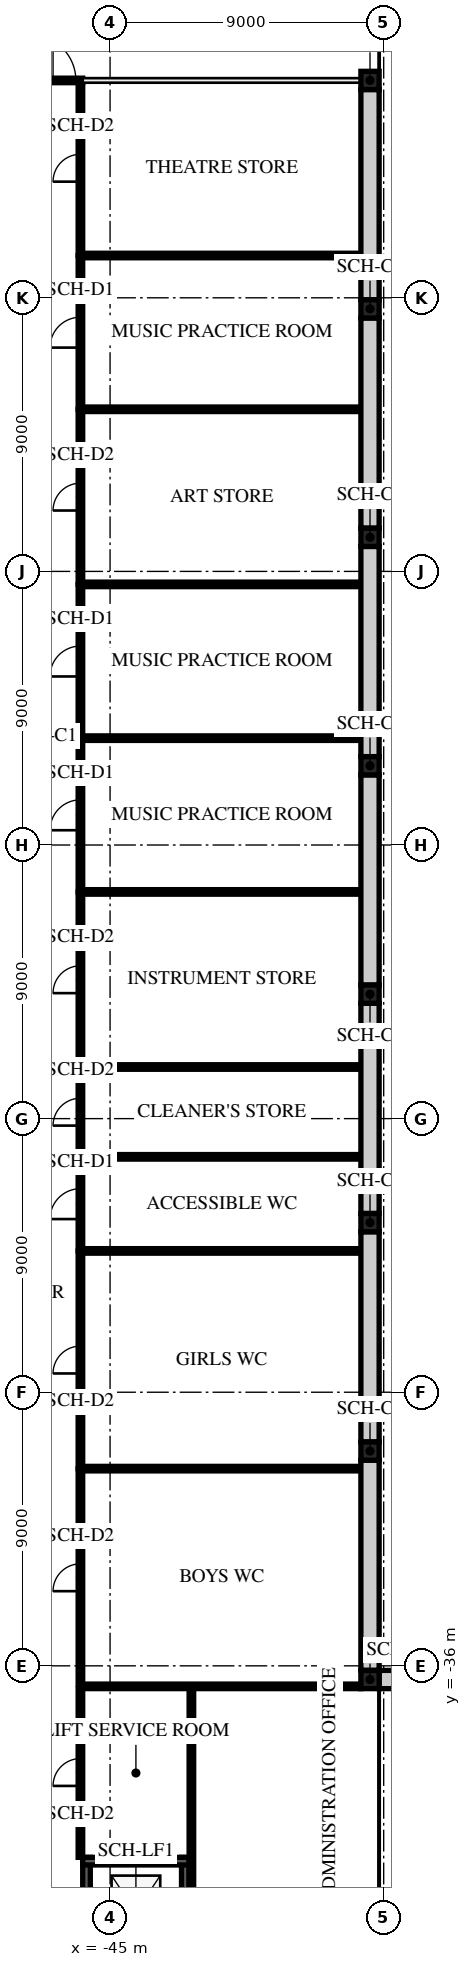
"""IFC4 building model, lengths in metres.
Left out: names, types, materials, properties, quantities, classifications, styles, units other than length and angle.
Written with IfcOpenShell. Run it as: python <this file> out.ifc"""

import sys

from ifc_helpers import new_model, si_unit, direction, frame, frame_2d, origin, origin_2d, place, context, subcontext, project, spatial, rectangle, extrude, element, fill, save


model = new_model("IFC4")
c1 = context("Model", 3, precision=1e-05, world=origin(), true_north=direction((0.0, 1.0)))
c2 = subcontext(c1, "Body", "Model", "MODEL_VIEW")
j1 = project(units=[si_unit("LENGTHUNIT", "METRE"), si_unit("PLANEANGLEUNIT", "RADIAN")], contexts=[c1])
p1 = place(None, origin())
s1 = spatial("IfcSite", under=j1, at=p1, CompositionType="ELEMENT")
p2 = place(p1, origin())
s2 = spatial("IfcBuilding", under=s1, at=p2, CompositionType="ELEMENT")
p3 = place(p2, origin())
s3 = spatial("IfcBuildingStorey", under=s2, at=p3, CompositionType="ELEMENT", Elevation=0.0)
p4 = place(p3, frame((-36.0, -18.0, 0.0), z_axis=(0.0, 0.0, 1.0), x_axis=(1.0, 0.0, 0.0)))
e1 = element("IfcWall", 1, at=p4, inside=s3, PredefinedType="PARTITIONING", context=c2, shape_type="SweptSolid", body=[
    extrude(rectangle(XDim=0.9, YDim=0.15, at=frame_2d((0.45, 0.0))), origin(), (0.0, 0.0, 1.0), 4.1),
])
p5 = place(p3, frame((-36.0, -13.0, 0.0), z_axis=(0.0, 0.0, 1.0), x_axis=(1.0, 0.0, 0.0)))
e2 = element("IfcWall", 2, at=p5, inside=s3, PredefinedType="PARTITIONING", context=c2, shape_type="SweptSolid", body=[
    extrude(rectangle(XDim=18.075, YDim=0.15, at=frame_2d((9.038, 0.0))), origin(), (0.0, 0.0, 1.0), 4.1),
])
p6 = place(p5, frame((8.1, 0.0, 0.0)))
e3 = element("IfcOpeningElement", 3, at=p6, cuts=e2, PredefinedType="OPENING", context=c2, shape_type="SweptSolid", body=[
    extrude(rectangle(XDim=1.8, YDim=2.1, at=frame_2d((0.9, 1.05))), frame((0.0, 0.085, 0.0), z_axis=(0.0, -1.0, 0.0), x_axis=(1.0, 0.0, 0.0)), (0.0, 0.0, 1.0), 0.17),
])
for number, where, z_axis, x_axis in (
    (4, (-36.0, -4.5, 0.0), (0.0, 0.0, 1.0), (1.0, 0.0, 0.0)),
    (5, (-36.0, 4.5, 0.0), (0.0, 0.0, 1.0), (1.0, 0.0, 0.0)),
):
    element("IfcWall", number, at=place(p3, frame(where, z_axis=z_axis, x_axis=x_axis)), inside=s3, PredefinedType="PARTITIONING", context=c2, shape_type="SweptSolid", body=[
        extrude(rectangle(XDim=17.925, YDim=0.1, at=frame_2d((8.962, 0.0))), origin(), (0.0, 0.0, 1.0), 4.1),
    ])
p7 = place(p3, frame((-36.0, 13.0, 0.0), z_axis=(0.0, 0.0, 1.0), x_axis=(1.0, 0.0, 0.0)))
e6 = element("IfcWall", 6, at=p7, inside=s3, PredefinedType="PARTITIONING", context=c2, shape_type="SweptSolid", body=[
    extrude(rectangle(XDim=18.075, YDim=0.15, at=frame_2d((9.038, 0.0))), origin(), (0.0, 0.0, 1.0), 4.1),
])
p8 = place(p7, frame((8.5, 0.0, 0.0)))
e7 = element("IfcOpeningElement", 7, at=p8, cuts=e6, PredefinedType="OPENING", context=c2, shape_type="SweptSolid", body=[
    extrude(rectangle(XDim=1.0, YDim=2.1, at=frame_2d((0.5, 1.05))), frame((0.0, 0.085, 0.0), z_axis=(0.0, -1.0, 0.0), x_axis=(1.0, 0.0, 0.0)), (0.0, 0.0, 1.0), 0.17),
])
for number, where, z_axis, x_axis in (
    (8, (-45.775, -45.9, -1.5), (0.0, 0.0, 1.0), (0.0, 1.0, 0.0)),
    (9, (-42.525, -45.9, -1.5), (0.0, 0.0, 1.0), (0.0, 1.0, 0.0)),
):
    element("IfcWall", number, at=place(p3, frame(where, z_axis=z_axis, x_axis=x_axis)), inside=s3, PredefinedType="SHEAR", context=c2, shape_type="SweptSolid", body=[
        extrude(rectangle(XDim=3.6, YDim=0.25, at=frame_2d((1.8, 0.0))), origin(), (0.0, 0.0, 1.0), 6.0),
    ])
p9 = place(p3, frame((-45.9, -42.425, -1.5), z_axis=(0.0, 0.0, 1.0), x_axis=(1.0, 0.0, 0.0)))
e10 = element("IfcWall", 10, at=p9, inside=s3, PredefinedType="SHEAR", context=c2, shape_type="SweptSolid", body=[
    extrude(rectangle(XDim=3.5, YDim=0.25, at=frame_2d((1.75, 0.0))), origin(), (0.0, 0.0, 1.0), 6.0),
])
for number, where, z_axis, x_axis in (
    (11, (-36.45, -36.45, -0.2), (0.0, 0.0, 1.0), (1.0, 0.0, 0.0)),
    (12, (-36.45, -28.936, -0.2), (0.0, 0.0, 1.0), (1.0, 0.0, 0.0)),
    (13, (-36.45, -21.421, -0.2), (0.0, 0.0, 1.0), (1.0, 0.0, 0.0)),
    (14, (-36.45, -13.907, -0.2), (0.0, 0.0, 1.0), (1.0, 0.0, 0.0)),
    (15, (-36.45, -6.393, -0.2), (0.0, 0.0, 1.0), (1.0, 0.0, 0.0)),
    (16, (-36.45, 1.121, -0.2), (0.0, 0.0, 1.0), (1.0, 0.0, 0.0)),
    (17, (-36.45, 8.636, -0.2), (0.0, 0.0, 1.0), (1.0, 0.0, 0.0)),
    (18, (-36.45, 16.15, -0.2), (0.0, 0.0, 1.0), (1.0, 0.0, 0.0)),
):
    element("IfcColumn", number, at=place(p3, frame(where, z_axis=z_axis, x_axis=x_axis)), inside=s3, PredefinedType="COLUMN", context=c2, shape_type="SweptSolid", body=[
        extrude(rectangle(XDim=0.6, YDim=0.6, at=origin_2d()), origin(), (0.0, 0.0, 1.0), 4.7),
    ])
for number, where, z_axis, x_axis in (
    (19, (-45.9, -29.513, 0.0), (0.0, 0.0, 1.0), (1.0, 0.0, 0.0)),
    (20, (-45.9, -22.352, 0.0), (0.0, 0.0, 1.0), (1.0, 0.0, 0.0)),
    (21, (-45.9, -19.257, 0.0), (0.0, 0.0, 1.0), (1.0, 0.0, 0.0)),
    (22, (-45.9, -16.302, 0.0), (0.0, 0.0, 1.0), (1.0, 0.0, 0.0)),
    (23, (-45.9, -10.543, 0.0), (0.0, 0.0, 1.0), (1.0, 0.0, 0.0)),
    (24, (-45.9, -5.485, 0.0), (0.0, 0.0, 1.0), (1.0, 0.0, 0.0)),
    (25, (-45.9, -0.427, 0.0), (0.0, 0.0, 1.0), (1.0, 0.0, 0.0)),
    (26, (-45.9, 5.333, 0.0), (0.0, 0.0, 1.0), (1.0, 0.0, 0.0)),
    (27, (-45.9, 10.391, 0.0), (0.0, 0.0, 1.0), (1.0, 0.0, 0.0)),
):
    element("IfcWall", number, at=place(p3, frame(where, z_axis=z_axis, x_axis=x_axis)), inside=s3, PredefinedType="PARTITIONING", context=c2, shape_type="SweptSolid", body=[
        extrude(rectangle(XDim=9.15, YDim=0.15, at=frame_2d((4.575, 0.0))), origin(), (0.0, 0.0, 1.0), 4.1),
    ])
p10 = place(p3, frame((-45.975, -36.6, 0.0), z_axis=(0.0, 0.0, 1.0), x_axis=(0.0, 1.0, 0.0)))
e28 = element("IfcWall", 28, at=p10, inside=s3, PredefinedType="PARTITIONING", context=c2, shape_type="SweptSolid", body=[
    extrude(rectangle(XDim=7.087, YDim=0.15, at=frame_2d((3.543, 0.0))), origin(), (0.0, 0.0, 1.0), 4.1),
])
p11 = place(p10, frame((3.056, 0.0, 0.0)))
e29 = element("IfcOpeningElement", 29, at=p11, cuts=e28, PredefinedType="OPENING", context=c2, shape_type="SweptSolid", body=[
    extrude(rectangle(XDim=0.9, YDim=2.1, at=frame_2d((0.45, 1.05))), frame((0.0, 0.085, 0.0), z_axis=(0.0, -1.0, 0.0), x_axis=(1.0, 0.0, 0.0)), (0.0, 0.0, 1.0), 0.17),
])
p12 = place(p3, frame((-45.975, -29.513, 0.0), z_axis=(0.0, 0.0, 1.0), x_axis=(0.0, 1.0, 0.0)))
e30 = element("IfcWall", 30, at=p12, inside=s3, PredefinedType="PARTITIONING", context=c2, shape_type="SweptSolid", body=[
    extrude(rectangle(XDim=7.162, YDim=0.15, at=frame_2d((3.581, 0.0))), origin(), (0.0, 0.0, 1.0), 4.1),
])
p13 = place(p12, frame((3.131, 0.0, 0.0)))
e31 = element("IfcOpeningElement", 31, at=p13, cuts=e30, PredefinedType="OPENING", context=c2, shape_type="SweptSolid", body=[
    extrude(rectangle(XDim=0.9, YDim=2.1, at=frame_2d((0.45, 1.05))), frame((0.0, 0.085, 0.0), z_axis=(0.0, -1.0, 0.0), x_axis=(1.0, 0.0, 0.0)), (0.0, 0.0, 1.0), 0.17),
])
p14 = place(p3, frame((-45.975, -22.352, 0.0), z_axis=(0.0, 0.0, 1.0), x_axis=(0.0, 1.0, 0.0)))
e32 = element("IfcWall", 32, at=p14, inside=s3, PredefinedType="PARTITIONING", context=c2, shape_type="SweptSolid", body=[
    extrude(rectangle(XDim=3.095, YDim=0.15, at=frame_2d((1.547, 0.0))), origin(), (0.0, 0.0, 1.0), 4.1),
])
p15 = place(p14, frame((1.048, 0.0, 0.0)))
e33 = element("IfcOpeningElement", 33, at=p15, cuts=e32, PredefinedType="OPENING", context=c2, shape_type="SweptSolid", body=[
    extrude(rectangle(XDim=1.0, YDim=2.1, at=frame_2d((0.5, 1.05))), frame((0.0, 0.085, 0.0), z_axis=(0.0, -1.0, 0.0), x_axis=(1.0, 0.0, 0.0)), (0.0, 0.0, 1.0), 0.17),
])
p16 = place(p3, frame((-45.975, -19.257, 0.0), z_axis=(0.0, 0.0, 1.0), x_axis=(0.0, 1.0, 0.0)))
e34 = element("IfcWall", 34, at=p16, inside=s3, PredefinedType="PARTITIONING", context=c2, shape_type="SweptSolid", body=[
    extrude(rectangle(XDim=2.955, YDim=0.15, at=frame_2d((1.477, 0.0))), origin(), (0.0, 0.0, 1.0), 4.1),
])
p17 = place(p16, frame((1.027, 0.0, 0.0)))
e35 = element("IfcOpeningElement", 35, at=p17, cuts=e34, PredefinedType="OPENING", context=c2, shape_type="SweptSolid", body=[
    extrude(rectangle(XDim=0.9, YDim=2.1, at=frame_2d((0.45, 1.05))), frame((0.0, 0.085, 0.0), z_axis=(0.0, -1.0, 0.0), x_axis=(1.0, 0.0, 0.0)), (0.0, 0.0, 1.0), 0.17),
])
p18 = place(p3, frame((-45.975, -16.302, 0.0), z_axis=(0.0, 0.0, 1.0), x_axis=(0.0, 1.0, 0.0)))
e36 = element("IfcWall", 36, at=p18, inside=s3, PredefinedType="PARTITIONING", context=c2, shape_type="SweptSolid", body=[
    extrude(rectangle(XDim=5.759, YDim=0.15, at=frame_2d((2.88, 0.0))), origin(), (0.0, 0.0, 1.0), 4.1),
])
p19 = place(p18, frame((2.43, 0.0, 0.0)))
e37 = element("IfcOpeningElement", 37, at=p19, cuts=e36, PredefinedType="OPENING", context=c2, shape_type="SweptSolid", body=[
    extrude(rectangle(XDim=0.9, YDim=2.1, at=frame_2d((0.45, 1.05))), frame((0.0, 0.085, 0.0), z_axis=(0.0, -1.0, 0.0), x_axis=(1.0, 0.0, 0.0)), (0.0, 0.0, 1.0), 0.17),
])
p20 = place(p3, frame((-45.975, -10.543, 0.0), z_axis=(0.0, 0.0, 1.0), x_axis=(0.0, 1.0, 0.0)))
e38 = element("IfcWall", 38, at=p20, inside=s3, PredefinedType="PARTITIONING", context=c2, shape_type="SweptSolid", body=[
    extrude(rectangle(XDim=5.058, YDim=0.15, at=frame_2d((2.529, 0.0))), origin(), (0.0, 0.0, 1.0), 4.1),
])
p21 = place(p20, frame((2.029, 0.0, 0.0)))
e39 = element("IfcOpeningElement", 39, at=p21, cuts=e38, PredefinedType="OPENING", context=c2, shape_type="SweptSolid", body=[
    extrude(rectangle(XDim=1.0, YDim=2.1, at=frame_2d((0.5, 1.05))), frame((0.0, 0.085, 0.0), z_axis=(0.0, -1.0, 0.0), x_axis=(1.0, 0.0, 0.0)), (0.0, 0.0, 1.0), 0.17),
])
p22 = place(p3, frame((-45.975, -5.485, 0.0), z_axis=(0.0, 0.0, 1.0), x_axis=(0.0, 1.0, 0.0)))
e40 = element("IfcWall", 40, at=p22, inside=s3, PredefinedType="PARTITIONING", context=c2, shape_type="SweptSolid", body=[
    extrude(rectangle(XDim=5.058, YDim=0.15, at=frame_2d((2.529, 0.0))), origin(), (0.0, 0.0, 1.0), 4.1),
])
p23 = place(p22, frame((2.029, 0.0, 0.0)))
e41 = element("IfcOpeningElement", 41, at=p23, cuts=e40, PredefinedType="OPENING", context=c2, shape_type="SweptSolid", body=[
    extrude(rectangle(XDim=1.0, YDim=2.1, at=frame_2d((0.5, 1.05))), frame((0.0, 0.085, 0.0), z_axis=(0.0, -1.0, 0.0), x_axis=(1.0, 0.0, 0.0)), (0.0, 0.0, 1.0), 0.17),
])
p24 = place(p3, frame((-45.975, -0.427, 0.0), z_axis=(0.0, 0.0, 1.0), x_axis=(0.0, 1.0, 0.0)))
e42 = element("IfcWall", 42, at=p24, inside=s3, PredefinedType="PARTITIONING", context=c2, shape_type="SweptSolid", body=[
    extrude(rectangle(XDim=5.759, YDim=0.15, at=frame_2d((2.88, 0.0))), origin(), (0.0, 0.0, 1.0), 4.1),
])
p25 = place(p24, frame((2.43, 0.0, 0.0)))
e43 = element("IfcOpeningElement", 43, at=p25, cuts=e42, PredefinedType="OPENING", context=c2, shape_type="SweptSolid", body=[
    extrude(rectangle(XDim=0.9, YDim=2.1, at=frame_2d((0.45, 1.05))), frame((0.0, 0.085, 0.0), z_axis=(0.0, -1.0, 0.0), x_axis=(1.0, 0.0, 0.0)), (0.0, 0.0, 1.0), 0.17),
])
p26 = place(p3, frame((-45.975, 5.333, 0.0), z_axis=(0.0, 0.0, 1.0), x_axis=(0.0, 1.0, 0.0)))
e44 = element("IfcWall", 44, at=p26, inside=s3, PredefinedType="PARTITIONING", context=c2, shape_type="SweptSolid", body=[
    extrude(rectangle(XDim=5.058, YDim=0.15, at=frame_2d((2.529, 0.0))), origin(), (0.0, 0.0, 1.0), 4.1),
])
p27 = place(p26, frame((2.029, 0.0, 0.0)))
e45 = element("IfcOpeningElement", 45, at=p27, cuts=e44, PredefinedType="OPENING", context=c2, shape_type="SweptSolid", body=[
    extrude(rectangle(XDim=1.0, YDim=2.1, at=frame_2d((0.5, 1.05))), frame((0.0, 0.085, 0.0), z_axis=(0.0, -1.0, 0.0), x_axis=(1.0, 0.0, 0.0)), (0.0, 0.0, 1.0), 0.17),
])
p28 = place(p3, frame((-45.975, 10.391, 0.0), z_axis=(0.0, 0.0, 1.0), x_axis=(0.0, 1.0, 0.0)))
e46 = element("IfcWall", 46, at=p28, inside=s3, PredefinedType="PARTITIONING", context=c2, shape_type="SweptSolid", body=[
    extrude(rectangle(XDim=5.684, YDim=0.15, at=frame_2d((2.842, 0.0))), origin(), (0.0, 0.0, 1.0), 4.1),
])
p29 = place(p28, frame((2.43, 0.0, 0.0)))
e47 = element("IfcOpeningElement", 47, at=p29, cuts=e46, PredefinedType="OPENING", context=c2, shape_type="SweptSolid", body=[
    extrude(rectangle(XDim=0.9, YDim=2.1, at=frame_2d((0.45, 1.05))), frame((0.0, 0.085, 0.0), z_axis=(0.0, -1.0, 0.0), x_axis=(1.0, 0.0, 0.0)), (0.0, 0.0, 1.0), 0.17),
])
for number, where, z_axis, x_axis in (
    (48, (-36.45, 15.85, -0.2), (0.0, 0.0, 1.0), (0.0, -1.0, 0.0)),
    (49, (-36.45, 8.336, -0.2), (0.0, 0.0, 1.0), (0.0, -1.0, 0.0)),
    (50, (-36.45, 0.821, -0.2), (0.0, 0.0, 1.0), (0.0, -1.0, 0.0)),
    (51, (-36.45, -6.693, -0.2), (0.0, 0.0, 1.0), (0.0, -1.0, 0.0)),
    (52, (-36.45, -14.207, -0.2), (0.0, 0.0, 1.0), (0.0, -1.0, 0.0)),
    (53, (-36.45, -21.721, -0.2), (0.0, 0.0, 1.0), (0.0, -1.0, 0.0)),
    (54, (-36.45, -29.236, -0.2), (0.0, 0.0, 1.0), (0.0, -1.0, 0.0)),
):
    element("IfcWall", number, at=place(p3, frame(where, z_axis=z_axis, x_axis=x_axis)), inside=s3, PredefinedType="STANDARD", context=c2, shape_type="SweptSolid", body=[
        extrude(rectangle(XDim=6.914, YDim=0.6, at=frame_2d((3.457, 0.0))), origin(), (0.0, 0.0, 1.0), 4.3),
    ])
p30 = place(p3, frame((-36.15, -36.45, -0.2), z_axis=(0.0, 0.0, 1.0), x_axis=(1.0, 0.0, 0.0)))
e55 = element("IfcWall", 55, at=p30, inside=s3, PredefinedType="STANDARD", context=c2, shape_type="SweptSolid", body=[
    extrude(rectangle(XDim=7.417, YDim=0.6, at=frame_2d((3.708, 0.0))), origin(), (0.0, 0.0, 1.0), 4.3),
])
for number, where, z_axis, x_axis in (
    (56, (-45.9, -36.675, 0.0), (0.0, 0.0, 1.0), (1.0, 0.0, 0.0)),
    (57, (-42.325, -45.9, 0.0), (0.0, 0.0, 1.0), (0.0, 1.0, 0.0)),
):
    element("IfcWall", number, at=place(p3, frame(where, z_axis=z_axis, x_axis=x_axis)), inside=s3, PredefinedType="PARTITIONING", context=c2, shape_type="SweptSolid", body=[
        extrude(rectangle(XDim=9.15, YDim=0.15, at=frame_2d((4.575, 0.0))), origin(), (0.0, 0.0, 1.0), 4.1),
    ])
p31 = place(p3, frame((-45.975, -42.3, 0.0), z_axis=(0.0, 0.0, 1.0), x_axis=(0.0, 1.0, 0.0)))
e58 = element("IfcWall", 58, at=p31, inside=s3, PredefinedType="PARTITIONING", context=c2, shape_type="SweptSolid", body=[
    extrude(rectangle(XDim=5.55, YDim=0.15, at=frame_2d((2.775, 0.0))), origin(), (0.0, 0.0, 1.0), 4.1),
])
p32 = place(p31, frame((2.35, 0.0, 0.0)))
e59 = element("IfcOpeningElement", 59, at=p32, cuts=e58, PredefinedType="OPENING", context=c2, shape_type="SweptSolid", body=[
    extrude(rectangle(XDim=0.9, YDim=2.1, at=frame_2d((0.45, 1.05))), frame((0.0, 0.085, 0.0), z_axis=(0.0, -1.0, 0.0), x_axis=(1.0, 0.0, 0.0)), (0.0, 0.0, 1.0), 0.17),
])
p33 = place(p3, frame((-47.85, 16.15, 0.0), z_axis=(0.0, 0.0, 1.0), x_axis=(1.0, 0.0, 0.0)))
e60 = element("IfcWall", 60, at=p33, inside=s3, PredefinedType="PARTITIONING", context=c2, shape_type="SweptSolid", body=[
    extrude(rectangle(XDim=1.95, YDim=0.15, at=frame_2d((0.975, 0.0))), origin(), (0.0, 0.0, 1.0), 4.1),
])
p34 = place(p33, frame((0.225, 0.0, 0.0)))
e61 = element("IfcOpeningElement", 61, at=p34, cuts=e60, PredefinedType="OPENING", context=c2, shape_type="SweptSolid", body=[
    extrude(rectangle(XDim=1.5, YDim=2.4, at=frame_2d((0.75, 1.2))), frame((0.0, 0.085, 0.0), z_axis=(0.0, -1.0, 0.0), x_axis=(1.0, 0.0, 0.0)), (0.0, 0.0, 1.0), 0.17),
])
p35 = place(p3, frame((-35.7, 18.0, 0.0), z_axis=(0.0, 0.0, 1.0), x_axis=(0.0, -1.0, 0.0)))
e62 = element("IfcWall", 62, at=p35, inside=s3, PredefinedType="STANDARD", context=c2, shape_type="SweptSolid", body=[
    extrude(rectangle(XDim=48.876, YDim=0.6, at=frame_2d((24.438, 0.0))), origin(), (0.0, 0.0, 1.0), 4.1),
])
p36 = place(p3, frame((-35.7, -30.876, 0.0), z_axis=(0.0, 0.0, 1.0), x_axis=(0.707106781187, -0.707106781187, 0.0)))
e63 = element("IfcWall", 63, at=p36, inside=s3, PredefinedType="STANDARD", context=c2, shape_type="SweptSolid", body=[
    extrude(rectangle(XDim=6.823, YDim=0.6, at=frame_2d((3.411, 0.0))), origin(), (0.0, 0.0, 1.0), 4.1),
])
p37 = place(p11, origin())
e64 = element("IfcDoor", 64, at=p37, inside=s3, OperationType="SINGLE_SWING_RIGHT", PredefinedType="DOOR", context=c2, shape_type="SweptSolid", body=[
    extrude(rectangle(XDim=0.9, YDim=2.1, at=frame_2d((0.45, 1.05))), frame((0.0, 0.025, 0.0), z_axis=(0.0, -1.0, 0.0), x_axis=(1.0, 0.0, 0.0)), (0.0, 0.0, 1.0), 0.05),
])
fill(e29, e64)
p38 = place(p13, origin())
e65 = element("IfcDoor", 65, at=p38, inside=s3, OperationType="SINGLE_SWING_LEFT", PredefinedType="DOOR", context=c2, shape_type="SweptSolid", body=[
    extrude(rectangle(XDim=0.9, YDim=2.1, at=frame_2d((0.45, 1.05))), frame((0.0, 0.025, 0.0), z_axis=(0.0, -1.0, 0.0), x_axis=(1.0, 0.0, 0.0)), (0.0, 0.0, 1.0), 0.05),
])
fill(e31, e65)
p39 = place(p15, origin())
e66 = element("IfcDoor", 66, at=p39, inside=s3, OperationType="SINGLE_SWING_RIGHT", PredefinedType="DOOR", context=c2, shape_type="SweptSolid", body=[
    extrude(rectangle(XDim=1.0, YDim=2.1, at=frame_2d((0.5, 1.05))), frame((0.0, 0.025, 0.0), z_axis=(0.0, -1.0, 0.0), x_axis=(1.0, 0.0, 0.0)), (0.0, 0.0, 1.0), 0.05),
])
fill(e33, e66)
p40 = place(p17, origin())
e67 = element("IfcDoor", 67, at=p40, inside=s3, OperationType="SINGLE_SWING_LEFT", PredefinedType="DOOR", context=c2, shape_type="SweptSolid", body=[
    extrude(rectangle(XDim=0.9, YDim=2.1, at=frame_2d((0.45, 1.05))), frame((0.0, 0.025, 0.0), z_axis=(0.0, -1.0, 0.0), x_axis=(1.0, 0.0, 0.0)), (0.0, 0.0, 1.0), 0.05),
])
fill(e35, e67)
p41 = place(p19, origin())
e68 = element("IfcDoor", 68, at=p41, inside=s3, OperationType="SINGLE_SWING_RIGHT", PredefinedType="DOOR", context=c2, shape_type="SweptSolid", body=[
    extrude(rectangle(XDim=0.9, YDim=2.1, at=frame_2d((0.45, 1.05))), frame((0.0, 0.025, 0.0), z_axis=(0.0, -1.0, 0.0), x_axis=(1.0, 0.0, 0.0)), (0.0, 0.0, 1.0), 0.05),
])
fill(e37, e68)
p42 = place(p21, origin())
e69 = element("IfcDoor", 69, at=p42, inside=s3, OperationType="SINGLE_SWING_LEFT", PredefinedType="DOOR", context=c2, shape_type="SweptSolid", body=[
    extrude(rectangle(XDim=1.0, YDim=2.1, at=frame_2d((0.5, 1.05))), frame((0.0, 0.025, 0.0), z_axis=(0.0, -1.0, 0.0), x_axis=(1.0, 0.0, 0.0)), (0.0, 0.0, 1.0), 0.05),
])
fill(e39, e69)
p43 = place(p23, origin())
e70 = element("IfcDoor", 70, at=p43, inside=s3, OperationType="SINGLE_SWING_RIGHT", PredefinedType="DOOR", context=c2, shape_type="SweptSolid", body=[
    extrude(rectangle(XDim=1.0, YDim=2.1, at=frame_2d((0.5, 1.05))), frame((0.0, 0.025, 0.0), z_axis=(0.0, -1.0, 0.0), x_axis=(1.0, 0.0, 0.0)), (0.0, 0.0, 1.0), 0.05),
])
fill(e41, e70)
p44 = place(p25, origin())
e71 = element("IfcDoor", 71, at=p44, inside=s3, OperationType="SINGLE_SWING_LEFT", PredefinedType="DOOR", context=c2, shape_type="SweptSolid", body=[
    extrude(rectangle(XDim=0.9, YDim=2.1, at=frame_2d((0.45, 1.05))), frame((0.0, 0.025, 0.0), z_axis=(0.0, -1.0, 0.0), x_axis=(1.0, 0.0, 0.0)), (0.0, 0.0, 1.0), 0.05),
])
fill(e43, e71)
p45 = place(p27, origin())
e72 = element("IfcDoor", 72, at=p45, inside=s3, OperationType="SINGLE_SWING_RIGHT", PredefinedType="DOOR", context=c2, shape_type="SweptSolid", body=[
    extrude(rectangle(XDim=1.0, YDim=2.1, at=frame_2d((0.5, 1.05))), frame((0.0, 0.025, 0.0), z_axis=(0.0, -1.0, 0.0), x_axis=(1.0, 0.0, 0.0)), (0.0, 0.0, 1.0), 0.05),
])
fill(e45, e72)
p46 = place(p29, origin())
e73 = element("IfcDoor", 73, at=p46, inside=s3, OperationType="SINGLE_SWING_LEFT", PredefinedType="DOOR", context=c2, shape_type="SweptSolid", body=[
    extrude(rectangle(XDim=0.9, YDim=2.1, at=frame_2d((0.45, 1.05))), frame((0.0, 0.025, 0.0), z_axis=(0.0, -1.0, 0.0), x_axis=(1.0, 0.0, 0.0)), (0.0, 0.0, 1.0), 0.05),
])
fill(e47, e73)
p47 = place(p32, origin())
e74 = element("IfcDoor", 74, at=p47, inside=s3, OperationType="SINGLE_SWING_RIGHT", PredefinedType="DOOR", context=c2, shape_type="SweptSolid", body=[
    extrude(rectangle(XDim=0.9, YDim=2.1, at=frame_2d((0.45, 1.05))), frame((0.0, 0.025, 0.0), z_axis=(0.0, -1.0, 0.0), x_axis=(1.0, 0.0, 0.0)), (0.0, 0.0, 1.0), 0.05),
])
fill(e59, e74)
p48 = place(p34, origin())
e75 = element("IfcDoor", 75, at=p48, inside=s3, OperationType="DOUBLE_DOOR_SINGLE_SWING", PredefinedType="DOOR", context=c2, shape_type="SweptSolid", body=[
    extrude(rectangle(XDim=1.5, YDim=2.4, at=frame_2d((0.75, 1.2))), frame((0.0, 0.025, 0.0), z_axis=(0.0, -1.0, 0.0), x_axis=(1.0, 0.0, 0.0)), (0.0, 0.0, 1.0), 0.05),
])
fill(e61, e75)
save(model, sys.argv[1])
